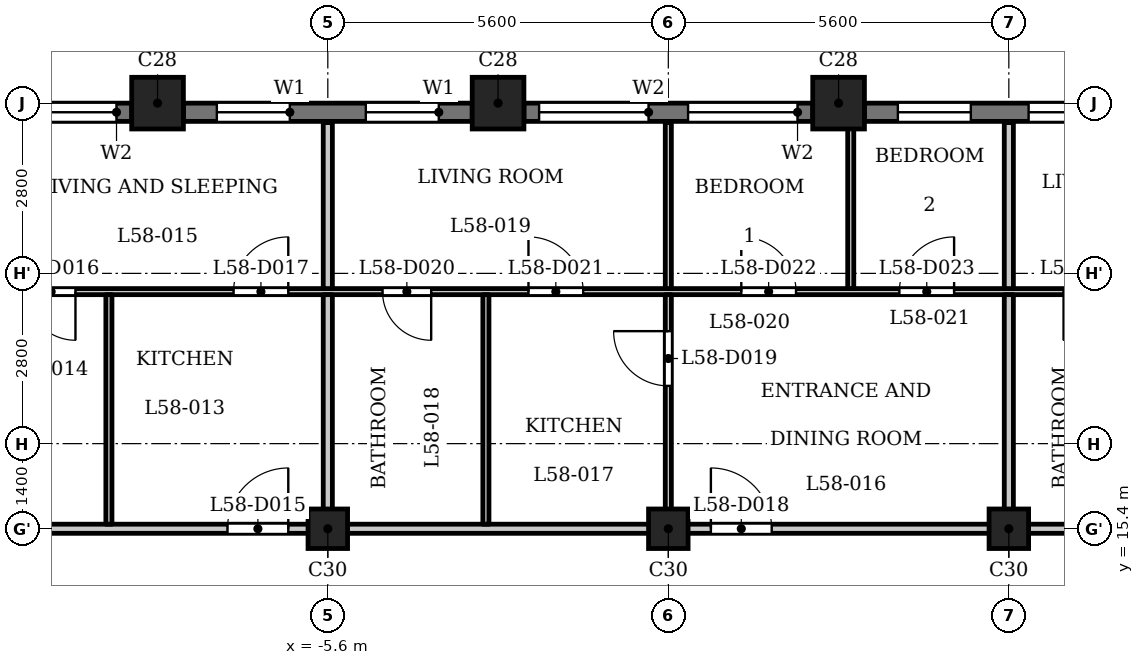
"""IFC4 building model, lengths in metres.
Left out: names, types, materials, properties, quantities, classifications, styles, units other than length and angle.
Written with IfcOpenShell. Run it as: python <this file> out.ifc"""

import sys

from ifc_helpers import new_model, si_unit, direction, frame, frame_2d, origin, origin_2d, place, context, subcontext, project, spatial, rectangle, extrude, element, fill, save


model = new_model("IFC4")
c1 = context("Model", 3, precision=1e-05, world=origin(), true_north=direction((0.0, 1.0)))
c2 = subcontext(c1, "Body", "Model", "MODEL_VIEW")
j1 = project(units=[si_unit("LENGTHUNIT", "METRE"), si_unit("PLANEANGLEUNIT", "RADIAN")], contexts=[c1])
p1 = place(None, origin())
s1 = spatial("IfcSite", under=j1, at=p1, CompositionType="ELEMENT")
p2 = place(p1, origin())
s2 = spatial("IfcBuilding", under=s1, at=p2, CompositionType="ELEMENT")
p3 = place(p2, frame((0.0, 0.0, 223.9)))
s3 = spatial("IfcBuildingStorey", under=s2, at=p3, CompositionType="ELEMENT", Elevation=223.9)
for number, where, z_axis, x_axis in (
    (1, (2.8, 22.4, 0.0), (0.0, 0.0, 1.0), (1.0, 0.0, 0.0)),
    (2, (-2.8, 22.4, 0.0), (0.0, 0.0, 1.0), (1.0, 0.0, 0.0)),
    (3, (-8.4, 22.4, 0.0), (0.0, 0.0, 1.0), (1.0, 0.0, 0.0)),
):
    element("IfcColumn", number, at=place(p3, frame(where, z_axis=z_axis, x_axis=x_axis)), inside=s3, PredefinedType="COLUMN", context=c2, shape_type="SweptSolid", body=[
        extrude(rectangle(XDim=0.85, YDim=0.85, at=origin_2d()), origin(), (0.0, 0.0, 1.0), 3.5),
    ])
for number, where, z_axis, x_axis in (
    (4, (-5.6, 15.4, 0.0), (0.0, 0.0, 1.0), (1.0, 0.0, 0.0)),
    (5, (0.0, 15.4, 0.0), (0.0, 0.0, 1.0), (1.0, 0.0, 0.0)),
    (6, (5.6, 15.4, 0.0), (0.0, 0.0, 1.0), (1.0, 0.0, 0.0)),
):
    element("IfcColumn", number, at=place(p3, frame(where, z_axis=z_axis, x_axis=x_axis)), inside=s3, PredefinedType="COLUMN", context=c2, shape_type="SweptSolid", body=[
        extrude(rectangle(XDim=0.65, YDim=0.65, at=origin_2d()), origin(), (0.0, 0.0, 1.0), 3.5),
    ])
p4 = place(p3, frame((7.975, 22.25, 0.0), z_axis=(0.0, 0.0, 1.0), x_axis=(-1.0, 0.0, 0.0)))
e7 = element("IfcWall", 7, at=p4, inside=s3, PredefinedType="SOLIDWALL", context=c2, shape_type="SweptSolid", body=[
    extrude(rectangle(XDim=4.75, YDim=0.3, at=frame_2d((2.375, 0.0))), origin(), (0.0, 0.0, 1.0), 2.5),
])
p5 = place(p4, frame((0.25, 0.0, 0.9)))
e8 = element("IfcOpeningElement", 8, at=p5, cuts=e7, PredefinedType="OPENING", context=c2, shape_type="SweptSolid", body=[
    extrude(rectangle(XDim=1.8, YDim=1.25, at=frame_2d((0.9, 0.625))), frame((0.0, 0.16, 0.0), z_axis=(0.0, -1.0, 0.0), x_axis=(1.0, 0.0, 0.0)), (0.0, 0.0, 1.0), 0.32),
])
p6 = place(p4, frame((3.0, 0.0, 0.6)))
e9 = element("IfcOpeningElement", 9, at=p6, cuts=e7, PredefinedType="OPENING", context=c2, shape_type="SweptSolid", body=[
    extrude(rectangle(XDim=1.2, YDim=1.55, at=frame_2d((0.6, 0.775))), frame((0.0, 0.16, 0.0), z_axis=(0.0, -1.0, 0.0), x_axis=(1.0, 0.0, 0.0)), (0.0, 0.0, 1.0), 0.32),
])
p7 = place(p3, frame((2.375, 22.25, 0.0), z_axis=(0.0, 0.0, 1.0), x_axis=(-1.0, 0.0, 0.0)))
e10 = element("IfcWall", 10, at=p7, inside=s3, PredefinedType="SOLIDWALL", context=c2, shape_type="SweptSolid", body=[
    extrude(rectangle(XDim=4.75, YDim=0.3, at=frame_2d((2.375, 0.0))), origin(), (0.0, 0.0, 1.0), 2.5),
])
p8 = place(p7, frame((0.25, 0.0, 0.9)))
e11 = element("IfcOpeningElement", 11, at=p8, cuts=e10, PredefinedType="OPENING", context=c2, shape_type="SweptSolid", body=[
    extrude(rectangle(XDim=1.8, YDim=1.25, at=frame_2d((0.9, 0.625))), frame((0.0, 0.16, 0.0), z_axis=(0.0, -1.0, 0.0), x_axis=(1.0, 0.0, 0.0)), (0.0, 0.0, 1.0), 0.32),
])
p9 = place(p7, frame((2.7, 0.0, 0.9)))
e12 = element("IfcOpeningElement", 12, at=p9, cuts=e10, PredefinedType="OPENING", context=c2, shape_type="SweptSolid", body=[
    extrude(rectangle(XDim=1.8, YDim=1.25, at=frame_2d((0.9, 0.625))), frame((0.0, 0.16, 0.0), z_axis=(0.0, -1.0, 0.0), x_axis=(1.0, 0.0, 0.0)), (0.0, 0.0, 1.0), 0.32),
])
p10 = place(p3, frame((-3.225, 22.25, 0.0), z_axis=(0.0, 0.0, 1.0), x_axis=(-1.0, 0.0, 0.0)))
e13 = element("IfcWall", 13, at=p10, inside=s3, PredefinedType="SOLIDWALL", context=c2, shape_type="SweptSolid", body=[
    extrude(rectangle(XDim=4.75, YDim=0.3, at=frame_2d((2.375, 0.0))), origin(), (0.0, 0.0, 1.0), 2.5),
])
p11 = place(p10, frame((0.55, 0.0, 0.6)))
e14 = element("IfcOpeningElement", 14, at=p11, cuts=e13, PredefinedType="OPENING", context=c2, shape_type="SweptSolid", body=[
    extrude(rectangle(XDim=1.2, YDim=1.55, at=frame_2d((0.6, 0.775))), frame((0.0, 0.16, 0.0), z_axis=(0.0, -1.0, 0.0), x_axis=(1.0, 0.0, 0.0)), (0.0, 0.0, 1.0), 0.32),
])
p12 = place(p10, frame((3.0, 0.0, 0.6)))
e15 = element("IfcOpeningElement", 15, at=p12, cuts=e13, PredefinedType="OPENING", context=c2, shape_type="SweptSolid", body=[
    extrude(rectangle(XDim=1.2, YDim=1.55, at=frame_2d((0.6, 0.775))), frame((0.0, 0.16, 0.0), z_axis=(0.0, -1.0, 0.0), x_axis=(1.0, 0.0, 0.0)), (0.0, 0.0, 1.0), 0.32),
])
p13 = place(p3, frame((-8.825, 22.25, 0.0), z_axis=(0.0, 0.0, 1.0), x_axis=(-1.0, 0.0, 0.0)))
e16 = element("IfcWall", 16, at=p13, inside=s3, PredefinedType="SOLIDWALL", context=c2, shape_type="SweptSolid", body=[
    extrude(rectangle(XDim=4.75, YDim=0.3, at=frame_2d((2.375, 0.0))), origin(), (0.0, 0.0, 1.0), 2.5),
])
p14 = place(p13, frame((0.25, 0.0, 0.9)))
e17 = element("IfcOpeningElement", 17, at=p14, cuts=e16, PredefinedType="OPENING", context=c2, shape_type="SweptSolid", body=[
    extrude(rectangle(XDim=1.8, YDim=1.25, at=frame_2d((0.9, 0.625))), frame((0.0, 0.16, 0.0), z_axis=(0.0, -1.0, 0.0), x_axis=(1.0, 0.0, 0.0)), (0.0, 0.0, 1.0), 0.32),
])
p15 = place(p13, frame((3.0, 0.0, 0.6)))
e18 = element("IfcOpeningElement", 18, at=p15, cuts=e16, PredefinedType="OPENING", context=c2, shape_type="SweptSolid", body=[
    extrude(rectangle(XDim=1.2, YDim=1.55, at=frame_2d((0.6, 0.775))), frame((0.0, 0.16, 0.0), z_axis=(0.0, -1.0, 0.0), x_axis=(1.0, 0.0, 0.0)), (0.0, 0.0, 1.0), 0.32),
])
p16 = place(p3, frame((-24.684, 15.4, 0.0), z_axis=(0.0, 0.0, 1.0), x_axis=(1.0, 0.0, 0.0)))
e19 = element("IfcWall", 19, at=p16, inside=s3, PredefinedType="PARTITIONING", context=c2, shape_type="SweptSolid", body=[
    extrude(rectangle(XDim=49.368, YDim=0.15, at=frame_2d((24.684, 0.0))), origin(), (0.0, 0.0, 1.0), 3.2),
])
p17 = place(p16, frame((6.234, 0.0, 0.0)))
e20 = element("IfcOpeningElement", 20, at=p17, cuts=e19, PredefinedType="OPENING", context=c2, shape_type="SweptSolid", body=[
    extrude(rectangle(XDim=1.0, YDim=2.1, at=frame_2d((0.5, 1.05))), frame((0.0, 0.085, 0.0), z_axis=(0.0, -1.0, 0.0), x_axis=(1.0, 0.0, 0.0)), (0.0, 0.0, 1.0), 0.17),
])
p18 = place(p16, frame((17.434, 0.0, 0.0)))
e21 = element("IfcOpeningElement", 21, at=p18, cuts=e19, PredefinedType="OPENING", context=c2, shape_type="SweptSolid", body=[
    extrude(rectangle(XDim=1.0, YDim=2.1, at=frame_2d((0.5, 1.05))), frame((0.0, 0.085, 0.0), z_axis=(0.0, -1.0, 0.0), x_axis=(1.0, 0.0, 0.0)), (0.0, 0.0, 1.0), 0.17),
])
p19 = place(p16, frame((25.384, 0.0, 0.0)))
e22 = element("IfcOpeningElement", 22, at=p19, cuts=e19, PredefinedType="OPENING", context=c2, shape_type="SweptSolid", body=[
    extrude(rectangle(XDim=1.0, YDim=2.1, at=frame_2d((0.5, 1.05))), frame((0.0, 0.085, 0.0), z_axis=(0.0, -1.0, 0.0), x_axis=(1.0, 0.0, 0.0)), (0.0, 0.0, 1.0), 0.17),
])
p20 = place(p16, frame((33.484, 0.0, 0.0)))
e23 = element("IfcOpeningElement", 23, at=p20, cuts=e19, PredefinedType="OPENING", context=c2, shape_type="SweptSolid", body=[
    extrude(rectangle(XDim=1.0, YDim=2.1, at=frame_2d((0.5, 1.05))), frame((0.0, 0.085, 0.0), z_axis=(0.0, -1.0, 0.0), x_axis=(1.0, 0.0, 0.0)), (0.0, 0.0, 1.0), 0.17),
])
p21 = place(p16, frame((47.225, 0.0, 0.0)))
e24 = element("IfcOpeningElement", 24, at=p21, cuts=e19, PredefinedType="OPENING", context=c2, shape_type="SweptSolid", body=[
    extrude(rectangle(XDim=1.0, YDim=2.1, at=frame_2d((0.5, 1.05))), frame((0.0, 0.085, 0.0), z_axis=(0.0, -1.0, 0.0), x_axis=(1.0, 0.0, 0.0)), (0.0, 0.0, 1.0), 0.17),
])
p22 = place(p3, frame((-22.256, 19.3, 0.0), z_axis=(0.0, 0.0, 1.0), x_axis=(1.0, 0.0, 0.0)))
e25 = element("IfcWall", 25, at=p22, inside=s3, PredefinedType="PARTITIONING", context=c2, shape_type="SweptSolid", body=[
    extrude(rectangle(XDim=44.511, YDim=0.1, at=frame_2d((22.256, 0.0))), origin(), (0.0, 0.0, 1.0), 3.2),
])
p23 = place(p22, frame((9.606, 0.0, 0.0)))
e26 = element("IfcOpeningElement", 26, at=p23, cuts=e25, PredefinedType="OPENING", context=c2, shape_type="SweptSolid", body=[
    extrude(rectangle(XDim=0.8, YDim=2.1, at=frame_2d((0.4, 1.05))), frame((0.0, 0.06, 0.0), z_axis=(0.0, -1.0, 0.0), x_axis=(1.0, 0.0, 0.0)), (0.0, 0.0, 1.0), 0.12),
])
p24 = place(p22, frame((3.906, 0.0, 0.0)))
e27 = element("IfcOpeningElement", 27, at=p24, cuts=e25, PredefinedType="OPENING", context=c2, shape_type="SweptSolid", body=[
    extrude(rectangle(XDim=0.9, YDim=2.1, at=frame_2d((0.45, 1.05))), frame((0.0, 0.06, 0.0), z_axis=(0.0, -1.0, 0.0), x_axis=(1.0, 0.0, 0.0)), (0.0, 0.0, 1.0), 0.12),
])
p25 = place(p22, frame((11.706, 0.0, 0.0)))
e28 = element("IfcOpeningElement", 28, at=p25, cuts=e25, PredefinedType="OPENING", context=c2, shape_type="SweptSolid", body=[
    extrude(rectangle(XDim=0.8, YDim=2.1, at=frame_2d((0.4, 1.05))), frame((0.0, 0.06, 0.0), z_axis=(0.0, -1.0, 0.0), x_axis=(1.0, 0.0, 0.0)), (0.0, 0.0, 1.0), 0.12),
])
p26 = place(p22, frame((15.106, 0.0, 0.0)))
e29 = element("IfcOpeningElement", 29, at=p26, cuts=e25, PredefinedType="OPENING", context=c2, shape_type="SweptSolid", body=[
    extrude(rectangle(XDim=0.9, YDim=2.1, at=frame_2d((0.45, 1.05))), frame((0.0, 0.06, 0.0), z_axis=(0.0, -1.0, 0.0), x_axis=(1.0, 0.0, 0.0)), (0.0, 0.0, 1.0), 0.12),
])
p27 = place(p22, frame((17.556, 0.0, 0.0)))
e30 = element("IfcOpeningElement", 30, at=p27, cuts=e25, PredefinedType="OPENING", context=c2, shape_type="SweptSolid", body=[
    extrude(rectangle(XDim=0.8, YDim=2.1, at=frame_2d((0.4, 1.05))), frame((0.0, 0.06, 0.0), z_axis=(0.0, -1.0, 0.0), x_axis=(1.0, 0.0, 0.0)), (0.0, 0.0, 1.0), 0.12),
])
p28 = place(p22, frame((19.956, 0.0, 0.0)))
e31 = element("IfcOpeningElement", 31, at=p28, cuts=e25, PredefinedType="OPENING", context=c2, shape_type="SweptSolid", body=[
    extrude(rectangle(XDim=0.9, YDim=2.1, at=frame_2d((0.45, 1.05))), frame((0.0, 0.06, 0.0), z_axis=(0.0, -1.0, 0.0), x_axis=(1.0, 0.0, 0.0)), (0.0, 0.0, 1.0), 0.12),
])
p29 = place(p22, frame((23.456, 0.0, 0.0)))
e32 = element("IfcOpeningElement", 32, at=p29, cuts=e25, PredefinedType="OPENING", context=c2, shape_type="SweptSolid", body=[
    extrude(rectangle(XDim=0.9, YDim=2.1, at=frame_2d((0.45, 1.05))), frame((0.0, 0.06, 0.0), z_axis=(0.0, -1.0, 0.0), x_axis=(1.0, 0.0, 0.0)), (0.0, 0.0, 1.0), 0.12),
])
p30 = place(p22, frame((26.056, 0.0, 0.0)))
e33 = element("IfcOpeningElement", 33, at=p30, cuts=e25, PredefinedType="OPENING", context=c2, shape_type="SweptSolid", body=[
    extrude(rectangle(XDim=0.9, YDim=2.1, at=frame_2d((0.45, 1.05))), frame((0.0, 0.06, 0.0), z_axis=(0.0, -1.0, 0.0), x_axis=(1.0, 0.0, 0.0)), (0.0, 0.0, 1.0), 0.12),
])
p31 = place(p22, frame((28.756, 0.0, 0.0)))
e34 = element("IfcOpeningElement", 34, at=p31, cuts=e25, PredefinedType="OPENING", context=c2, shape_type="SweptSolid", body=[
    extrude(rectangle(XDim=0.8, YDim=2.1, at=frame_2d((0.4, 1.05))), frame((0.0, 0.06, 0.0), z_axis=(0.0, -1.0, 0.0), x_axis=(1.0, 0.0, 0.0)), (0.0, 0.0, 1.0), 0.12),
])
p32 = place(p22, frame((31.156, 0.0, 0.0)))
e35 = element("IfcOpeningElement", 35, at=p32, cuts=e25, PredefinedType="OPENING", context=c2, shape_type="SweptSolid", body=[
    extrude(rectangle(XDim=0.9, YDim=2.1, at=frame_2d((0.45, 1.05))), frame((0.0, 0.06, 0.0), z_axis=(0.0, -1.0, 0.0), x_axis=(1.0, 0.0, 0.0)), (0.0, 0.0, 1.0), 0.12),
])
p33 = place(p22, frame((37.606, 0.0, 0.0)))
e36 = element("IfcOpeningElement", 36, at=p33, cuts=e25, PredefinedType="OPENING", context=c2, shape_type="SweptSolid", body=[
    extrude(rectangle(XDim=0.8, YDim=2.1, at=frame_2d((0.4, 1.05))), frame((0.0, 0.06, 0.0), z_axis=(0.0, -1.0, 0.0), x_axis=(1.0, 0.0, 0.0)), (0.0, 0.0, 1.0), 0.12),
])
p34 = place(p22, frame((42.028, 0.0, 0.0)))
e37 = element("IfcOpeningElement", 37, at=p34, cuts=e25, PredefinedType="OPENING", context=c2, shape_type="SweptSolid", body=[
    extrude(rectangle(XDim=0.9, YDim=2.1, at=frame_2d((0.45, 1.05))), frame((0.0, 0.06, 0.0), z_axis=(0.0, -1.0, 0.0), x_axis=(1.0, 0.0, 0.0)), (0.0, 0.0, 1.0), 0.12),
])
p35 = place(p3, frame((-9.2, 15.475, 0.0), z_axis=(0.0, 0.0, 1.0), x_axis=(0.0, 1.0, 0.0)))
e38 = element("IfcWall", 38, at=p35, inside=s3, PredefinedType="PARTITIONING", context=c2, shape_type="SweptSolid", body=[
    extrude(rectangle(XDim=3.775, YDim=0.1, at=frame_2d((1.887, 0.0))), origin(), (0.0, 0.0, 1.0), 3.2),
])
p36 = place(p3, frame((-5.6, 15.475, 0.0), z_axis=(0.0, 0.0, 1.0), x_axis=(0.0, 1.0, 0.0)))
e39 = element("IfcWall", 39, at=p36, inside=s3, PredefinedType="PARTITIONING", context=c2, shape_type="SweptSolid", body=[
    extrude(rectangle(XDim=3.775, YDim=0.15, at=frame_2d((1.887, 0.0))), origin(), (0.0, 0.0, 1.0), 3.2),
])
p37 = place(p3, frame((-5.6, 19.35, 0.0), z_axis=(0.0, 0.0, 1.0), x_axis=(0.0, 1.0, 0.0)))
e40 = element("IfcWall", 40, at=p37, inside=s3, PredefinedType="PARTITIONING", context=c2, shape_type="SweptSolid", body=[
    extrude(rectangle(XDim=2.73, YDim=0.15, at=frame_2d((1.365, 0.0))), origin(), (0.0, 0.0, 1.0), 3.2),
])
p38 = place(p3, frame((-3.0, 15.475, 0.0), z_axis=(0.0, 0.0, 1.0), x_axis=(0.0, 1.0, 0.0)))
e41 = element("IfcWall", 41, at=p38, inside=s3, PredefinedType="PARTITIONING", context=c2, shape_type="SweptSolid", body=[
    extrude(rectangle(XDim=3.775, YDim=0.1, at=frame_2d((1.887, 0.0))), origin(), (0.0, 0.0, 1.0), 3.2),
])
p39 = place(p3, frame((0.0, 15.475, 0.0), z_axis=(0.0, 0.0, 1.0), x_axis=(0.0, 1.0, 0.0)))
e42 = element("IfcWall", 42, at=p39, inside=s3, PredefinedType="PARTITIONING", context=c2, shape_type="SweptSolid", body=[
    extrude(rectangle(XDim=3.775, YDim=0.1, at=frame_2d((1.887, 0.0))), origin(), (0.0, 0.0, 1.0), 3.2),
])
p40 = place(p39, frame((2.275, 0.0, 0.0)))
e43 = element("IfcOpeningElement", 43, at=p40, cuts=e42, PredefinedType="OPENING", context=c2, shape_type="SweptSolid", body=[
    extrude(rectangle(XDim=0.9, YDim=2.1, at=frame_2d((0.45, 1.05))), frame((0.0, 0.06, 0.0), z_axis=(0.0, -1.0, 0.0), x_axis=(1.0, 0.0, 0.0)), (0.0, 0.0, 1.0), 0.12),
])
p41 = place(p3, frame((0.0, 19.35, 0.0), z_axis=(0.0, 0.0, 1.0), x_axis=(0.0, 1.0, 0.0)))
e44 = element("IfcWall", 44, at=p41, inside=s3, PredefinedType="PARTITIONING", context=c2, shape_type="SweptSolid", body=[
    extrude(rectangle(XDim=2.73, YDim=0.1, at=frame_2d((1.365, 0.0))), origin(), (0.0, 0.0, 1.0), 3.2),
])
p42 = place(p3, frame((3.0, 19.35, 0.0), z_axis=(0.0, 0.0, 1.0), x_axis=(0.0, 1.0, 0.0)))
e45 = element("IfcWall", 45, at=p42, inside=s3, PredefinedType="PARTITIONING", context=c2, shape_type="SweptSolid", body=[
    extrude(rectangle(XDim=3.455, YDim=0.1, at=frame_2d((1.728, 0.0))), origin(), (0.0, 0.0, 1.0), 3.2),
])
p43 = place(p3, frame((5.6, 15.475, 0.0), z_axis=(0.0, 0.0, 1.0), x_axis=(0.0, 1.0, 0.0)))
e46 = element("IfcWall", 46, at=p43, inside=s3, PredefinedType="PARTITIONING", context=c2, shape_type="SweptSolid", body=[
    extrude(rectangle(XDim=3.775, YDim=0.15, at=frame_2d((1.887, 0.0))), origin(), (0.0, 0.0, 1.0), 3.2),
])
p44 = place(p3, frame((5.6, 19.35, 0.0), z_axis=(0.0, 0.0, 1.0), x_axis=(0.0, 1.0, 0.0)))
e47 = element("IfcWall", 47, at=p44, inside=s3, PredefinedType="PARTITIONING", context=c2, shape_type="SweptSolid", body=[
    extrude(rectangle(XDim=2.73, YDim=0.15, at=frame_2d((1.365, 0.0))), origin(), (0.0, 0.0, 1.0), 3.2),
])
p45 = place(p18, origin())
e48 = element("IfcDoor", 48, at=p45, inside=s3, OperationType="SINGLE_SWING_LEFT", PredefinedType="DOOR", context=c2, shape_type="SweptSolid", body=[
    extrude(rectangle(XDim=1.0, YDim=2.1, at=frame_2d((0.5, 1.05))), frame((0.0, 0.025, 0.0), z_axis=(0.0, -1.0, 0.0), x_axis=(1.0, 0.0, 0.0)), (0.0, 0.0, 1.0), 0.05),
])
fill(e21, e48)
p46 = place(p25, origin())
e49 = element("IfcDoor", 49, at=p46, inside=s3, OperationType="SINGLE_SWING_RIGHT", PredefinedType="DOOR", context=c2, shape_type="SweptSolid", body=[
    extrude(rectangle(XDim=0.8, YDim=2.1, at=frame_2d((0.4, 1.05))), frame((0.0, 0.025, 0.0), z_axis=(0.0, -1.0, 0.0), x_axis=(1.0, 0.0, 0.0)), (0.0, 0.0, 1.0), 0.05),
])
fill(e28, e49)
p47 = place(p26, origin())
e50 = element("IfcDoor", 50, at=p47, inside=s3, OperationType="SINGLE_SWING_LEFT", PredefinedType="DOOR", context=c2, shape_type="SweptSolid", body=[
    extrude(rectangle(XDim=0.9, YDim=2.1, at=frame_2d((0.45, 1.05))), frame((0.0, 0.025, 0.0), z_axis=(0.0, -1.0, 0.0), x_axis=(1.0, 0.0, 0.0)), (0.0, 0.0, 1.0), 0.05),
])
fill(e29, e50)
p48 = place(p19, origin())
e51 = element("IfcDoor", 51, at=p48, inside=s3, OperationType="SINGLE_SWING_RIGHT", PredefinedType="DOOR", context=c2, shape_type="SweptSolid", body=[
    extrude(rectangle(XDim=1.0, YDim=2.1, at=frame_2d((0.5, 1.05))), frame((0.0, 0.025, 0.0), z_axis=(0.0, -1.0, 0.0), x_axis=(1.0, 0.0, 0.0)), (0.0, 0.0, 1.0), 0.05),
])
fill(e22, e51)
p49 = place(p40, origin())
e52 = element("IfcDoor", 52, at=p49, inside=s3, OperationType="SINGLE_SWING_LEFT", PredefinedType="DOOR", context=c2, shape_type="SweptSolid", body=[
    extrude(rectangle(XDim=0.9, YDim=2.1, at=frame_2d((0.45, 1.05))), frame((0.0, 0.025, 0.0), z_axis=(0.0, -1.0, 0.0), x_axis=(1.0, 0.0, 0.0)), (0.0, 0.0, 1.0), 0.05),
])
fill(e43, e52)
p50 = place(p27, origin())
e53 = element("IfcDoor", 53, at=p50, inside=s3, OperationType="SINGLE_SWING_RIGHT", PredefinedType="DOOR", context=c2, shape_type="SweptSolid", body=[
    extrude(rectangle(XDim=0.8, YDim=2.1, at=frame_2d((0.4, 1.05))), frame((0.0, 0.025, 0.0), z_axis=(0.0, -1.0, 0.0), x_axis=(1.0, 0.0, 0.0)), (0.0, 0.0, 1.0), 0.05),
])
fill(e30, e53)
p51 = place(p28, origin())
e54 = element("IfcDoor", 54, at=p51, inside=s3, OperationType="SINGLE_SWING_RIGHT", PredefinedType="DOOR", context=c2, shape_type="SweptSolid", body=[
    extrude(rectangle(XDim=0.9, YDim=2.1, at=frame_2d((0.45, 1.05))), frame((0.0, 0.025, 0.0), z_axis=(0.0, -1.0, 0.0), x_axis=(1.0, 0.0, 0.0)), (0.0, 0.0, 1.0), 0.05),
])
fill(e31, e54)
p52 = place(p29, origin())
e55 = element("IfcDoor", 55, at=p52, inside=s3, OperationType="SINGLE_SWING_RIGHT", PredefinedType="DOOR", context=c2, shape_type="SweptSolid", body=[
    extrude(rectangle(XDim=0.9, YDim=2.1, at=frame_2d((0.45, 1.05))), frame((0.0, 0.025, 0.0), z_axis=(0.0, -1.0, 0.0), x_axis=(1.0, 0.0, 0.0)), (0.0, 0.0, 1.0), 0.05),
])
fill(e32, e55)
p53 = place(p30, origin())
e56 = element("IfcDoor", 56, at=p53, inside=s3, OperationType="SINGLE_SWING_LEFT", PredefinedType="DOOR", context=c2, shape_type="SweptSolid", body=[
    extrude(rectangle(XDim=0.9, YDim=2.1, at=frame_2d((0.45, 1.05))), frame((0.0, 0.025, 0.0), z_axis=(0.0, -1.0, 0.0), x_axis=(1.0, 0.0, 0.0)), (0.0, 0.0, 1.0), 0.05),
])
fill(e33, e56)
p54 = place(p31, origin())
e57 = element("IfcDoor", 57, at=p54, inside=s3, OperationType="SINGLE_SWING_LEFT", PredefinedType="DOOR", context=c2, shape_type="SweptSolid", body=[
    extrude(rectangle(XDim=0.8, YDim=2.1, at=frame_2d((0.4, 1.05))), frame((0.0, 0.025, 0.0), z_axis=(0.0, -1.0, 0.0), x_axis=(1.0, 0.0, 0.0)), (0.0, 0.0, 1.0), 0.05),
])
fill(e34, e57)
p55 = place(p5, origin())
e58 = element("IfcWindow", 58, at=p55, inside=s3, PartitioningType="SINGLE_PANEL", PredefinedType="WINDOW", context=c2, shape_type="SweptSolid", body=[
    extrude(rectangle(XDim=1.8, YDim=1.25, at=frame_2d((0.9, 0.625))), frame((0.0, 0.03, 0.0), z_axis=(0.0, -1.0, 0.0), x_axis=(1.0, 0.0, 0.0)), (0.0, 0.0, 1.0), 0.06),
])
fill(e8, e58)
p56 = place(p6, origin())
e59 = element("IfcWindow", 59, at=p56, inside=s3, PartitioningType="SINGLE_PANEL", PredefinedType="WINDOW", context=c2, shape_type="SweptSolid", body=[
    extrude(rectangle(XDim=1.2, YDim=1.55, at=frame_2d((0.6, 0.775))), frame((0.0, 0.03, 0.0), z_axis=(0.0, -1.0, 0.0), x_axis=(1.0, 0.0, 0.0)), (0.0, 0.0, 1.0), 0.06),
])
fill(e9, e59)
p57 = place(p8, origin())
e60 = element("IfcWindow", 60, at=p57, inside=s3, PartitioningType="SINGLE_PANEL", PredefinedType="WINDOW", context=c2, shape_type="SweptSolid", body=[
    extrude(rectangle(XDim=1.8, YDim=1.25, at=frame_2d((0.9, 0.625))), frame((0.0, 0.03, 0.0), z_axis=(0.0, -1.0, 0.0), x_axis=(1.0, 0.0, 0.0)), (0.0, 0.0, 1.0), 0.06),
])
fill(e11, e60)
p58 = place(p9, origin())
e61 = element("IfcWindow", 61, at=p58, inside=s3, PartitioningType="SINGLE_PANEL", PredefinedType="WINDOW", context=c2, shape_type="SweptSolid", body=[
    extrude(rectangle(XDim=1.8, YDim=1.25, at=frame_2d((0.9, 0.625))), frame((0.0, 0.03, 0.0), z_axis=(0.0, -1.0, 0.0), x_axis=(1.0, 0.0, 0.0)), (0.0, 0.0, 1.0), 0.06),
])
fill(e12, e61)
p59 = place(p11, origin())
e62 = element("IfcWindow", 62, at=p59, inside=s3, PartitioningType="SINGLE_PANEL", PredefinedType="WINDOW", context=c2, shape_type="SweptSolid", body=[
    extrude(rectangle(XDim=1.2, YDim=1.55, at=frame_2d((0.6, 0.775))), frame((0.0, 0.03, 0.0), z_axis=(0.0, -1.0, 0.0), x_axis=(1.0, 0.0, 0.0)), (0.0, 0.0, 1.0), 0.06),
])
fill(e14, e62)
p60 = place(p12, origin())
e63 = element("IfcWindow", 63, at=p60, inside=s3, PartitioningType="SINGLE_PANEL", PredefinedType="WINDOW", context=c2, shape_type="SweptSolid", body=[
    extrude(rectangle(XDim=1.2, YDim=1.55, at=frame_2d((0.6, 0.775))), frame((0.0, 0.03, 0.0), z_axis=(0.0, -1.0, 0.0), x_axis=(1.0, 0.0, 0.0)), (0.0, 0.0, 1.0), 0.06),
])
fill(e15, e63)
p61 = place(p14, origin())
e64 = element("IfcWindow", 64, at=p61, inside=s3, PartitioningType="SINGLE_PANEL", PredefinedType="WINDOW", context=c2, shape_type="SweptSolid", body=[
    extrude(rectangle(XDim=1.8, YDim=1.25, at=frame_2d((0.9, 0.625))), frame((0.0, 0.03, 0.0), z_axis=(0.0, -1.0, 0.0), x_axis=(1.0, 0.0, 0.0)), (0.0, 0.0, 1.0), 0.06),
])
fill(e17, e64)
save(model, sys.argv[1])
